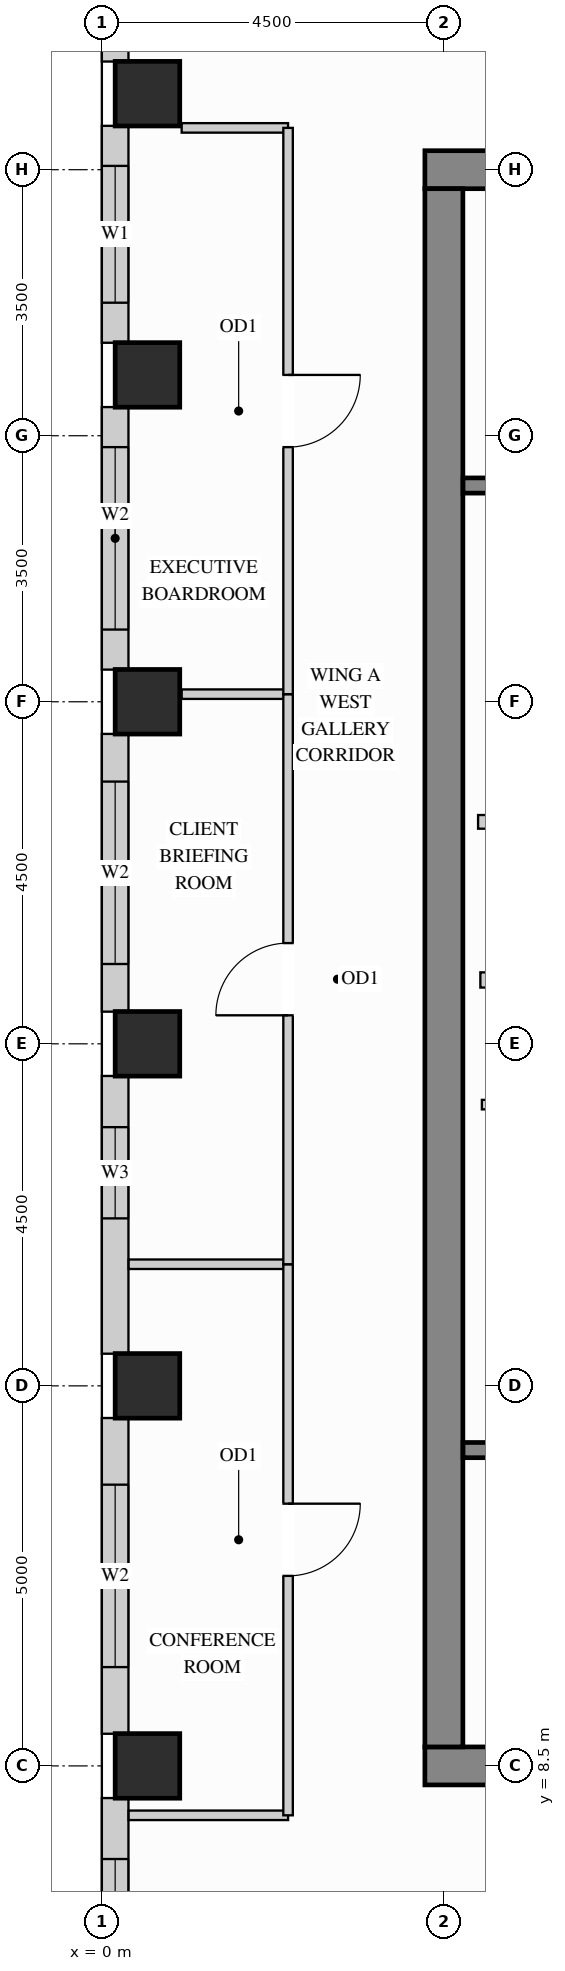
"""IFC4 building model, lengths in metres.
Left out: names, types, materials, properties, quantities, classifications, styles, units other than length and angle.
Written with IfcOpenShell. Run it as: python <this file> out.ifc"""

import sys

from ifc_helpers import new_model, si_unit, direction, frame, frame_2d, origin, origin_2d, place, context, subcontext, project, spatial, rectangle, extrude, source, transform, mapped, element, fill, save


model = new_model("IFC4")
c1 = context("Model", 3, precision=1e-05, world=origin(), true_north=direction((0.0, 1.0)))
c2 = subcontext(c1, "Body", "Model", "MODEL_VIEW")
j1 = project(units=[si_unit("LENGTHUNIT", "METRE"), si_unit("PLANEANGLEUNIT", "RADIAN")], contexts=[c1])
p1 = place(None, origin())
s1 = spatial("IfcSite", under=j1, at=p1, CompositionType="ELEMENT")
p2 = place(p1, origin())
s2 = spatial("IfcBuilding", under=s1, at=p2, CompositionType="ELEMENT")
p3 = place(p2, frame((0.0, 0.0, 237.6)))
s3 = spatial("IfcBuildingStorey", under=s2, at=p3, CompositionType="ELEMENT", Elevation=237.6)
m1 = source(origin(), c2, "Body", "SweptSolid", [
    extrude(rectangle(XDim=0.85, YDim=0.85, at=origin_2d()), origin(), (0.0, 0.0, 1.0), 3.4),
])
for number, where, z_axis, x_axis in (
    (1, (0.6, 13.5, 0.0), (0.0, 0.0, 1.0), (1.0, 0.0, 0.0)),
    (2, (0.6, 18.0, 0.0), (0.0, 0.0, 1.0), (1.0, 0.0, 0.0)),
    (3, (0.6, 22.5, 0.0), (0.0, 0.0, 1.0), (1.0, 0.0, 0.0)),
    (4, (0.6, 26.8, 0.0), (0.0, 0.0, 1.0), (1.0, 0.0, 0.0)),
    (5, (0.6, 30.5, 0.0), (0.0, 0.0, 1.0), (1.0, 0.0, 0.0)),
    (6, (0.6, 8.5, 0.0), (0.0, 0.0, 1.0), (1.0, 0.0, 0.0)),
):
    element("IfcColumn", number, at=place(p3, frame(where, z_axis=z_axis, x_axis=x_axis)), inside=s3, PredefinedType="COLUMN", context=c2, shape_type="MappedRepresentation", body=[
        mapped(m1, transform((0.0, 0.0, 0.0), x_axis=(1.0, 0.0, 0.0), y_axis=(0.0, 1.0, 0.0), z_axis=(0.0, 0.0, 1.0))),
    ])
m2 = source(origin(), c2, "Body", "SweptSolid", [
    extrude(rectangle(XDim=10.5, YDim=0.5, at=frame_2d((5.25, 0.0))), origin(), (0.0, 0.0, 1.0), 3.4),
])
for number, where, z_axis, x_axis in (
    (7, (4.25, 29.5, 0.0), (0.0, 0.0, 1.0), (1.0, 0.0, 0.0)),
    (8, (4.25, 8.5, 0.0), (0.0, 0.0, 1.0), (1.0, 0.0, 0.0)),
):
    element("IfcWall", number, at=place(p3, frame(where, z_axis=z_axis, x_axis=x_axis)), inside=s3, PredefinedType="SHEAR", context=c2, shape_type="MappedRepresentation", body=[
        mapped(m2, transform((0.0, 0.0, 0.0), x_axis=(1.0, 0.0, 0.0), y_axis=(0.0, 1.0, 0.0), z_axis=(0.0, 0.0, 1.0))),
    ])
m3 = source(origin(), c2, "Body", "SweptSolid", [
    extrude(rectangle(XDim=20.5, YDim=0.5, at=frame_2d((10.25, 0.0))), origin(), (0.0, 0.0, 1.0), 3.4),
])
p4 = place(p3, frame((4.5, 8.75, 0.0), z_axis=(0.0, 0.0, 1.0), x_axis=(0.0, 1.0, 0.0)))
e9 = element("IfcWall", 9, at=p4, inside=s3, PredefinedType="SHEAR", context=c2, shape_type="MappedRepresentation", body=[
    mapped(m3, transform((0.0, 0.0, 0.0), x_axis=(1.0, 0.0, 0.0), y_axis=(0.0, 1.0, 0.0), z_axis=(0.0, 0.0, 1.0))),
])
p5 = place(p3, frame((0.175, 34.577, 0.0), z_axis=(0.0, 0.0, 1.0), x_axis=(0.0, -1.0, 0.0)))
e10 = element("IfcWall", 10, at=p5, inside=s3, PredefinedType="SOLIDWALL", context=c2, shape_type="SweptSolid", body=[
    extrude(rectangle(XDim=3.654, YDim=0.35, at=frame_2d((1.827, 0.0))), origin(), (0.0, 0.0, 1.0), 3.385),
])
p6 = place(p5, frame((0.598, 0.0, 0.78)))
e11 = element("IfcOpeningElement", 11, at=p6, cuts=e10, PredefinedType="OPENING", context=c2, shape_type="SweptSolid", body=[
    extrude(rectangle(XDim=1.2, YDim=2.1, at=frame_2d((0.6, 1.05))), frame((0.0, 0.185, 0.0), z_axis=(0.0, -1.0, 0.0), x_axis=(1.0, 0.0, 0.0)), (0.0, 0.0, 1.0), 0.37),
])
p7 = place(p3, frame((0.175, 30.077, 0.0), z_axis=(0.0, 0.0, 1.0), x_axis=(0.0, -1.0, 0.0)))
e12 = element("IfcWall", 12, at=p7, inside=s3, PredefinedType="SOLIDWALL", context=c2, shape_type="SweptSolid", body=[
    extrude(rectangle(XDim=2.854, YDim=0.35, at=frame_2d((1.427, 0.0))), origin(), (0.0, 0.0, 1.0), 3.385),
])
p8 = place(p7, frame((0.527, 0.0, 0.78)))
e13 = element("IfcOpeningElement", 13, at=p8, cuts=e12, PredefinedType="OPENING", context=c2, shape_type="SweptSolid", body=[
    extrude(rectangle(XDim=1.8, YDim=2.1, at=frame_2d((0.9, 1.05))), frame((0.0, 0.185, 0.0), z_axis=(0.0, -1.0, 0.0), x_axis=(1.0, 0.0, 0.0)), (0.0, 0.0, 1.0), 0.37),
])
p9 = place(p3, frame((0.175, 26.377, 0.0), z_axis=(0.0, 0.0, 1.0), x_axis=(0.0, -1.0, 0.0)))
e14 = element("IfcWall", 14, at=p9, inside=s3, PredefinedType="SOLIDWALL", context=c2, shape_type="SweptSolid", body=[
    extrude(rectangle(XDim=3.454, YDim=0.35, at=frame_2d((1.727, 0.0))), origin(), (0.0, 0.0, 1.0), 3.385),
])
p10 = place(p9, frame((0.527, 0.0, 0.78)))
e15 = element("IfcOpeningElement", 15, at=p10, cuts=e14, PredefinedType="OPENING", context=c2, shape_type="SweptSolid", body=[
    extrude(rectangle(XDim=2.4, YDim=2.1, at=frame_2d((1.2, 1.05))), frame((0.0, 0.185, 0.0), z_axis=(0.0, -1.0, 0.0), x_axis=(1.0, 0.0, 0.0)), (0.0, 0.0, 1.0), 0.37),
])
p11 = place(p3, frame((0.175, 22.077, 0.0), z_axis=(0.0, 0.0, 1.0), x_axis=(0.0, -1.0, 0.0)))
e16 = element("IfcWall", 16, at=p11, inside=s3, PredefinedType="SOLIDWALL", context=c2, shape_type="SweptSolid", body=[
    extrude(rectangle(XDim=3.654, YDim=0.35, at=frame_2d((1.827, 0.0))), origin(), (0.0, 0.0, 1.0), 3.385),
])
p12 = place(p11, frame((0.627, 0.0, 0.78)))
e17 = element("IfcOpeningElement", 17, at=p12, cuts=e16, PredefinedType="OPENING", context=c2, shape_type="SweptSolid", body=[
    extrude(rectangle(XDim=2.4, YDim=2.1, at=frame_2d((1.2, 1.05))), frame((0.0, 0.185, 0.0), z_axis=(0.0, -1.0, 0.0), x_axis=(1.0, 0.0, 0.0)), (0.0, 0.0, 1.0), 0.37),
])
p13 = place(p3, frame((0.175, 17.577, 0.0), z_axis=(0.0, 0.0, 1.0), x_axis=(0.0, -1.0, 0.0)))
e18 = element("IfcWall", 18, at=p13, inside=s3, PredefinedType="SOLIDWALL", context=c2, shape_type="SweptSolid", body=[
    extrude(rectangle(XDim=3.654, YDim=0.35, at=frame_2d((1.827, 0.0))), origin(), (0.0, 0.0, 1.0), 3.385),
])
p14 = place(p13, frame((0.674, 0.0, 0.78)))
e19 = element("IfcOpeningElement", 19, at=p14, cuts=e18, PredefinedType="OPENING", context=c2, shape_type="SweptSolid", body=[
    extrude(rectangle(XDim=1.2, YDim=2.1, at=frame_2d((0.6, 1.05))), frame((0.0, 0.185, 0.0), z_axis=(0.0, -1.0, 0.0), x_axis=(1.0, 0.0, 0.0)), (0.0, 0.0, 1.0), 0.37),
])
p15 = place(p3, frame((0.175, 13.077, 0.0), z_axis=(0.0, 0.0, 1.0), x_axis=(0.0, -1.0, 0.0)))
e20 = element("IfcWall", 20, at=p15, inside=s3, PredefinedType="SOLIDWALL", context=c2, shape_type="SweptSolid", body=[
    extrude(rectangle(XDim=4.154, YDim=0.35, at=frame_2d((2.077, 0.0))), origin(), (0.0, 0.0, 1.0), 3.385),
])
p16 = place(p15, frame((0.877, 0.0, 0.78)))
e21 = element("IfcOpeningElement", 21, at=p16, cuts=e20, PredefinedType="OPENING", context=c2, shape_type="SweptSolid", body=[
    extrude(rectangle(XDim=2.4, YDim=2.1, at=frame_2d((1.2, 1.05))), frame((0.0, 0.185, 0.0), z_axis=(0.0, -1.0, 0.0), x_axis=(1.0, 0.0, 0.0)), (0.0, 0.0, 1.0), 0.37),
])
p17 = place(p3, frame((0.175, 8.077, 0.0), z_axis=(0.0, 0.0, 1.0), x_axis=(0.0, -1.0, 0.0)))
e22 = element("IfcWall", 22, at=p17, inside=s3, PredefinedType="SOLIDWALL", context=c2, shape_type="SweptSolid", body=[
    extrude(rectangle(XDim=4.154, YDim=0.35, at=frame_2d((2.077, 0.0))), origin(), (0.0, 0.0, 1.0), 3.385),
])
p18 = place(p17, frame((0.802, 0.0, 0.78)))
e23 = element("IfcOpeningElement", 23, at=p18, cuts=e22, PredefinedType="OPENING", context=c2, shape_type="SweptSolid", body=[
    extrude(rectangle(XDim=1.2, YDim=2.1, at=frame_2d((0.6, 1.05))), frame((0.0, 0.185, 0.0), z_axis=(0.0, -1.0, 0.0), x_axis=(1.0, 0.0, 0.0)), (0.0, 0.0, 1.0), 0.37),
])
m4 = source(origin(), c2, "Body", "SweptSolid", [
    extrude(rectangle(XDim=2.2, YDim=0.18, at=frame_2d((1.1, 0.0))), origin(), (0.0, 0.0, 1.0), 3.385),
])
p19 = place(p3, frame((4.95, 20.92, 0.0), z_axis=(0.0, 0.0, 1.0), x_axis=(1.0, 0.0, 0.0)))
e24 = element("IfcWall", 24, at=p19, inside=s3, PredefinedType="PARTITIONING", context=c2, shape_type="MappedRepresentation", body=[
    mapped(m4, transform((0.0, 0.0, 0.0), x_axis=(1.0, 0.0, 0.0), y_axis=(0.0, 1.0, 0.0), z_axis=(0.0, 0.0, 1.0))),
])
p20 = place(p3, frame((5.0, 17.2, 0.0), z_axis=(0.0, 0.0, 1.0), x_axis=(1.0, 0.0, 0.0)))
e25 = element("IfcWall", 25, at=p20, inside=s3, PredefinedType="PARTITIONING", context=c2, shape_type="SweptSolid", body=[
    extrude(rectangle(XDim=2.4, YDim=0.125, at=frame_2d((1.2, 0.0))), origin(), (0.0, 0.0, 1.0), 3.385),
])
p21 = place(p20, frame((0.7, 0.0, 0.0)))
e26 = element("IfcOpeningElement", 26, at=p21, cuts=e25, PredefinedType="OPENING", context=c2, shape_type="SweptSolid", body=[
    extrude(rectangle(XDim=0.85, YDim=2.1, at=frame_2d((0.425, 1.05))), frame((0.0, 0.073, 0.0), z_axis=(0.0, -1.0, 0.0), x_axis=(1.0, 0.0, 0.0)), (0.0, 0.0, 1.0), 0.145),
])
m5 = source(origin(), c2, "Body", "SweptSolid", [
    extrude(rectangle(XDim=1.4, YDim=0.125, at=frame_2d((0.7, 0.0))), origin(), (0.0, 0.0, 1.0), 3.385),
])
p22 = place(p3, frame((1.05, 30.05, 0.0), z_axis=(0.0, 0.0, 1.0), x_axis=(1.0, 0.0, 0.0)))
e27 = element("IfcWall", 27, at=p22, inside=s3, PredefinedType="PARTITIONING", context=c2, shape_type="MappedRepresentation", body=[
    mapped(m5, transform((0.0, 0.0, 0.0), x_axis=(1.0, 0.0, 0.0), y_axis=(0.0, 1.0, 0.0), z_axis=(0.0, 0.0, 1.0))),
])
m6 = source(origin(), c2, "Body", "SweptSolid", [
    extrude(rectangle(XDim=2.098, YDim=0.125, at=frame_2d((1.049, 0.0))), origin(), (0.0, 0.0, 1.0), 3.385),
])
for number, where, z_axis, x_axis in (
    (28, (0.352, 7.85, 0.0), (0.0, 0.0, 1.0), (1.0, 0.0, 0.0)),
    (29, (0.352, 15.1, 0.0), (0.0, 0.0, 1.0), (1.0, 0.0, 0.0)),
):
    element("IfcWall", number, at=place(p3, frame(where, z_axis=z_axis, x_axis=x_axis)), inside=s3, PredefinedType="PARTITIONING", context=c2, shape_type="MappedRepresentation", body=[
        mapped(m6, transform((0.0, 0.0, 0.0), x_axis=(1.0, 0.0, 0.0), y_axis=(0.0, 1.0, 0.0), z_axis=(0.0, 0.0, 1.0))),
    ])
p23 = place(p3, frame((1.05, 22.6, 0.0), z_axis=(0.0, 0.0, 1.0), x_axis=(1.0, 0.0, 0.0)))
e30 = element("IfcWall", 30, at=p23, inside=s3, PredefinedType="PARTITIONING", context=c2, shape_type="MappedRepresentation", body=[
    mapped(m5, transform((0.0, 0.0, 0.0), x_axis=(1.0, 0.0, 0.0), y_axis=(0.0, 1.0, 0.0), z_axis=(0.0, 0.0, 1.0))),
])
p24 = place(p3, frame((2.45, 7.85, 0.0), z_axis=(0.0, 0.0, 1.0), x_axis=(0.0, 1.0, 0.0)))
e31 = element("IfcWall", 31, at=p24, inside=s3, PredefinedType="PARTITIONING", context=c2, shape_type="SweptSolid", body=[
    extrude(rectangle(XDim=7.25, YDim=0.125, at=frame_2d((3.625, 0.0))), origin(), (0.0, 0.0, 1.0), 3.385),
])
p25 = place(p24, frame((3.15, 0.0, 0.0)))
e32 = element("IfcOpeningElement", 32, at=p25, cuts=e31, PredefinedType="OPENING", context=c2, shape_type="SweptSolid", body=[
    extrude(rectangle(XDim=0.95, YDim=2.15, at=frame_2d((0.475, 1.075))), frame((0.0, 0.073, 0.0), z_axis=(0.0, -1.0, 0.0), x_axis=(1.0, 0.0, 0.0)), (0.0, 0.0, 1.0), 0.145),
])
p26 = place(p3, frame((2.45, 15.1, 0.0), z_axis=(0.0, 0.0, 1.0), x_axis=(0.0, 1.0, 0.0)))
e33 = element("IfcWall", 33, at=p26, inside=s3, PredefinedType="PARTITIONING", context=c2, shape_type="SweptSolid", body=[
    extrude(rectangle(XDim=7.5, YDim=0.125, at=frame_2d((3.75, 0.0))), origin(), (0.0, 0.0, 1.0), 3.385),
])
p27 = place(p26, frame((3.275, 0.0, 0.0)))
e34 = element("IfcOpeningElement", 34, at=p27, cuts=e33, PredefinedType="OPENING", context=c2, shape_type="SweptSolid", body=[
    extrude(rectangle(XDim=0.95, YDim=2.15, at=frame_2d((0.475, 1.075))), frame((0.0, 0.073, 0.0), z_axis=(0.0, -1.0, 0.0), x_axis=(1.0, 0.0, 0.0)), (0.0, 0.0, 1.0), 0.145),
])
p28 = place(p3, frame((2.45, 22.6, 0.0), z_axis=(0.0, 0.0, 1.0), x_axis=(0.0, 1.0, 0.0)))
e35 = element("IfcWall", 35, at=p28, inside=s3, PredefinedType="PARTITIONING", context=c2, shape_type="SweptSolid", body=[
    extrude(rectangle(XDim=7.45, YDim=0.125, at=frame_2d((3.725, 0.0))), origin(), (0.0, 0.0, 1.0), 3.385),
])
p29 = place(p28, frame((3.25, 0.0, 0.0)))
e36 = element("IfcOpeningElement", 36, at=p29, cuts=e35, PredefinedType="OPENING", context=c2, shape_type="SweptSolid", body=[
    extrude(rectangle(XDim=0.95, YDim=2.15, at=frame_2d((0.475, 1.075))), frame((0.0, 0.073, 0.0), z_axis=(0.0, -1.0, 0.0), x_axis=(1.0, 0.0, 0.0)), (0.0, 0.0, 1.0), 0.145),
])
m7 = source(origin(), c2, "Body", "SweptSolid", [
    extrude(rectangle(XDim=2.09, YDim=0.2, at=frame_2d((1.045, 0.0))), origin(), (0.0, 0.0, 1.0), 3.385),
])
p30 = place(p3, frame((4.98, 18.84, 0.0), z_axis=(0.0, 0.0, 1.0), x_axis=(1.0, 0.0, 0.0)))
e37 = element("IfcWall", 37, at=p30, inside=s3, PredefinedType="PARTITIONING", context=c2, shape_type="MappedRepresentation", body=[
    mapped(m7, transform((0.0, 0.0, 0.0), x_axis=(1.0, 0.0, 0.0), y_axis=(0.0, 1.0, 0.0), z_axis=(0.0, 0.0, 1.0))),
])
p31 = place(p3, frame((4.752, 12.655, 0.0), z_axis=(0.0, 0.0, 1.0), x_axis=(1.0, 0.0, 0.0)))
e38 = element("IfcWall", 38, at=p31, inside=s3, PredefinedType="SHEAR", context=c2, shape_type="SweptSolid", body=[
    extrude(rectangle(XDim=7.653, YDim=0.2, at=frame_2d((3.827, 0.0))), origin(), (0.0, 0.0, 1.0), 3.4),
])
p32 = place(p31, frame((0.4, 0.0, 0.0)))
e39 = element("IfcOpeningElement", 39, at=p32, cuts=e38, PredefinedType="OPENING", context=c2, shape_type="SweptSolid", body=[
    extrude(rectangle(XDim=1.1, YDim=2.15, at=frame_2d((0.55, 1.075))), frame((0.0, 0.11, 0.0), z_axis=(0.0, -1.0, 0.0), x_axis=(1.0, 0.0, 0.0)), (0.0, 0.0, 1.0), 0.22),
])
p33 = place(p3, frame((4.752, 25.345, 0.0), z_axis=(0.0, 0.0, 1.0), x_axis=(1.0, 0.0, 0.0)))
e40 = element("IfcWall", 40, at=p33, inside=s3, PredefinedType="SHEAR", context=c2, shape_type="SweptSolid", body=[
    extrude(rectangle(XDim=7.653, YDim=0.2, at=frame_2d((3.827, 0.0))), origin(), (0.0, 0.0, 1.0), 3.4),
])
p34 = place(p33, frame((0.4, 0.0, 0.0)))
e41 = element("IfcOpeningElement", 41, at=p34, cuts=e40, PredefinedType="OPENING", context=c2, shape_type="SweptSolid", body=[
    extrude(rectangle(XDim=1.1, YDim=2.15, at=frame_2d((0.55, 1.075))), frame((0.0, 0.11, 0.0), z_axis=(0.0, -1.0, 0.0), x_axis=(1.0, 0.0, 0.0)), (0.0, 0.0, 1.0), 0.22),
])
m8 = source(origin(), c2, "Body", "SweptSolid", [
    extrude(rectangle(XDim=0.95, YDim=2.15, at=frame_2d((0.475, 1.075))), frame((0.0, 0.025, 0.0), z_axis=(0.0, -1.0, 0.0), x_axis=(1.0, 0.0, 0.0)), (0.0, 0.0, 1.0), 0.05),
])
p35 = place(p25, origin())
e42 = element("IfcDoor", 42, at=p35, inside=s3, OperationType="SINGLE_SWING_RIGHT", PredefinedType="DOOR", context=c2, shape_type="MappedRepresentation", body=[
    mapped(m8, transform((0.0, 0.0, 0.0), x_axis=(1.0, 0.0, 0.0), y_axis=(0.0, 1.0, 0.0), z_axis=(0.0, 0.0, 1.0))),
])
fill(e32, e42)
p36 = place(p27, origin())
e43 = element("IfcDoor", 43, at=p36, inside=s3, OperationType="SINGLE_SWING_LEFT", PredefinedType="DOOR", context=c2, shape_type="MappedRepresentation", body=[
    mapped(m8, transform((0.0, 0.0, 0.0), x_axis=(1.0, 0.0, 0.0), y_axis=(0.0, 1.0, 0.0), z_axis=(0.0, 0.0, 1.0))),
])
fill(e34, e43)
p37 = place(p29, origin())
e44 = element("IfcDoor", 44, at=p37, inside=s3, OperationType="SINGLE_SWING_RIGHT", PredefinedType="DOOR", context=c2, shape_type="MappedRepresentation", body=[
    mapped(m8, transform((0.0, 0.0, 0.0), x_axis=(1.0, 0.0, 0.0), y_axis=(0.0, 1.0, 0.0), z_axis=(0.0, 0.0, 1.0))),
])
fill(e36, e44)
m9 = source(origin(), c2, "Body", "SweptSolid", [
    extrude(rectangle(XDim=1.8, YDim=2.1, at=frame_2d((0.9, 1.05))), frame((0.0, 0.03, 0.0), z_axis=(0.0, -1.0, 0.0), x_axis=(1.0, 0.0, 0.0)), (0.0, 0.0, 1.0), 0.06),
])
p38 = place(p8, origin())
e45 = element("IfcWindow", 45, at=p38, inside=s3, PartitioningType="SINGLE_PANEL", PredefinedType="WINDOW", context=c2, shape_type="MappedRepresentation", body=[
    mapped(m9, transform((0.0, 0.0, 0.0), x_axis=(1.0, 0.0, 0.0), y_axis=(0.0, 1.0, 0.0), z_axis=(0.0, 0.0, 1.0))),
])
fill(e13, e45)
m10 = source(origin(), c2, "Body", "SweptSolid", [
    extrude(rectangle(XDim=2.4, YDim=2.1, at=frame_2d((1.2, 1.05))), frame((0.0, 0.03, 0.0), z_axis=(0.0, -1.0, 0.0), x_axis=(1.0, 0.0, 0.0)), (0.0, 0.0, 1.0), 0.06),
])
p39 = place(p10, origin())
e46 = element("IfcWindow", 46, at=p39, inside=s3, PartitioningType="SINGLE_PANEL", PredefinedType="WINDOW", context=c2, shape_type="MappedRepresentation", body=[
    mapped(m10, transform((0.0, 0.0, 0.0), x_axis=(1.0, 0.0, 0.0), y_axis=(0.0, 1.0, 0.0), z_axis=(0.0, 0.0, 1.0))),
])
fill(e15, e46)
p40 = place(p12, origin())
e47 = element("IfcWindow", 47, at=p40, inside=s3, PartitioningType="SINGLE_PANEL", PredefinedType="WINDOW", context=c2, shape_type="MappedRepresentation", body=[
    mapped(m10, transform((0.0, 0.0, 0.0), x_axis=(1.0, 0.0, 0.0), y_axis=(0.0, 1.0, 0.0), z_axis=(0.0, 0.0, 1.0))),
])
fill(e17, e47)
p41 = place(p16, origin())
e48 = element("IfcWindow", 48, at=p41, inside=s3, PartitioningType="SINGLE_PANEL", PredefinedType="WINDOW", context=c2, shape_type="MappedRepresentation", body=[
    mapped(m10, transform((0.0, 0.0, 0.0), x_axis=(1.0, 0.0, 0.0), y_axis=(0.0, 1.0, 0.0), z_axis=(0.0, 0.0, 1.0))),
])
fill(e21, e48)
m11 = source(origin(), c2, "Body", "SweptSolid", [
    extrude(rectangle(XDim=1.2, YDim=2.1, at=frame_2d((0.6, 1.05))), frame((0.0, 0.03, 0.0), z_axis=(0.0, -1.0, 0.0), x_axis=(1.0, 0.0, 0.0)), (0.0, 0.0, 1.0), 0.06),
])
p42 = place(p14, origin())
e49 = element("IfcWindow", 49, at=p42, inside=s3, PartitioningType="SINGLE_PANEL", PredefinedType="WINDOW", context=c2, shape_type="MappedRepresentation", body=[
    mapped(m11, transform((0.0, 0.0, 0.0), x_axis=(1.0, 0.0, 0.0), y_axis=(0.0, 1.0, 0.0), z_axis=(0.0, 0.0, 1.0))),
])
fill(e19, e49)
p43 = place(p18, origin())
e50 = element("IfcWindow", 50, at=p43, inside=s3, PartitioningType="SINGLE_PANEL", PredefinedType="WINDOW", context=c2, shape_type="MappedRepresentation", body=[
    mapped(m11, transform((0.0, 0.0, 0.0), x_axis=(1.0, 0.0, 0.0), y_axis=(0.0, 1.0, 0.0), z_axis=(0.0, 0.0, 1.0))),
])
fill(e23, e50)
save(model, sys.argv[1])
